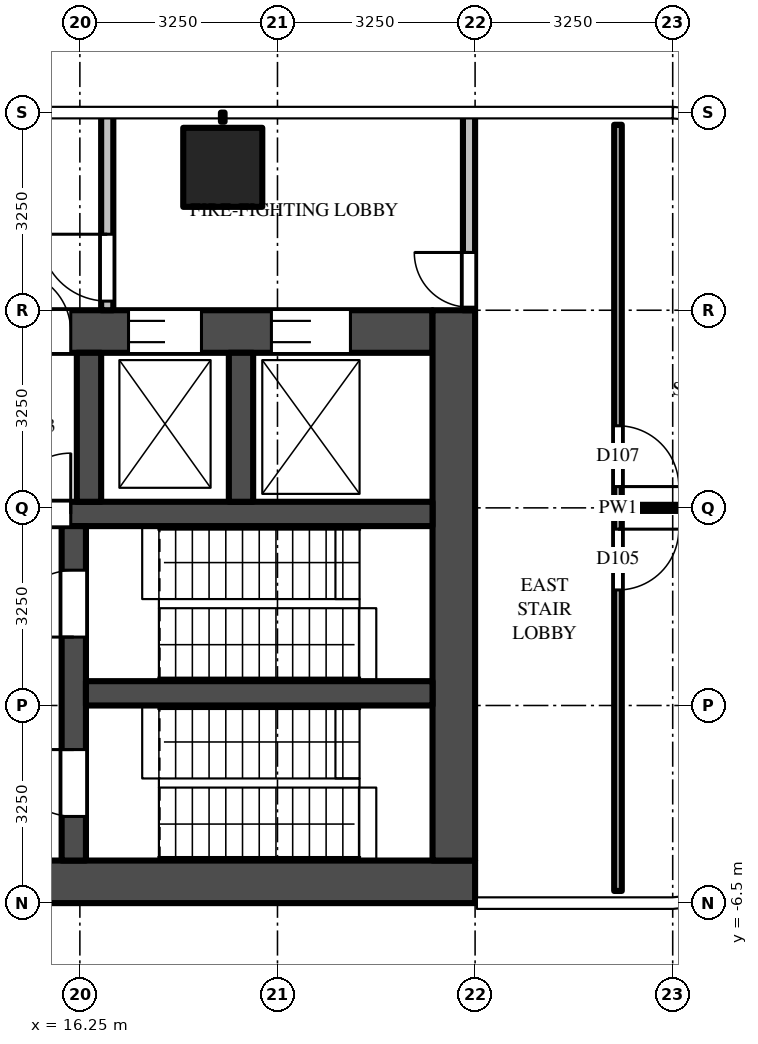
"""IFC4 building model, lengths in metres.
Left out: names, types, materials, properties, quantities, classifications, styles, units other than length and angle.
Written with IfcOpenShell. Run it as: python <this file> out.ifc"""

import sys

from ifc_helpers import new_model, si_unit, direction, frame, frame_2d, origin, origin_2d, place, context, subcontext, project, spatial, rectangle, extrude, source, transform, mapped, element, fill, save


model = new_model("IFC4")
c1 = context("Model", 3, precision=1e-05, world=origin(), true_north=direction((0.0, 1.0)))
c2 = subcontext(c1, "Body", "Model", "MODEL_VIEW")
j1 = project(units=[si_unit("LENGTHUNIT", "METRE"), si_unit("PLANEANGLEUNIT", "RADIAN")], contexts=[c1])
p1 = place(None, origin())
s1 = spatial("IfcSite", under=j1, at=p1, CompositionType="ELEMENT")
p2 = place(p1, origin())
s2 = spatial("IfcBuilding", under=s1, at=p2, CompositionType="ELEMENT")
p3 = place(p2, frame((0.0, 0.0, 106.5)))
s3 = spatial("IfcBuildingStorey", under=s2, at=p3, CompositionType="ELEMENT", Elevation=106.5)
m1 = source(origin(), c2, "Body", "SweptSolid", [
    extrude(rectangle(XDim=1.3, YDim=1.3, at=origin_2d()), origin(), (0.0, 0.0, 1.0), 4.5),
])
p4 = place(p3, frame((18.6, 5.6, 0.0), z_axis=(0.0, 0.0, 1.0), x_axis=(1.0, 0.0, 0.0)))
e1 = element("IfcColumn", 1, at=p4, inside=s3, PredefinedType="COLUMN", context=c2, shape_type="MappedRepresentation", body=[
    mapped(m1, transform((0.0, 0.0, 0.0))),
])
m2 = source(origin(), c2, "Body", "SweptSolid", [
    extrude(rectangle(XDim=16.5, YDim=0.7, at=frame_2d((8.25, 0.0))), origin(), (0.0, 0.0, 1.0), 4.25),
])
p5 = place(p3, frame((6.25, -6.15, 0.0), z_axis=(0.0, 0.0, 1.0), x_axis=(1.0, 0.0, 0.0)))
e2 = element("IfcWall", 2, at=p5, inside=s3, PredefinedType="SHEAR", context=c2, shape_type="MappedRepresentation", body=[
    mapped(m2, transform((0.0, 0.0, 0.0))),
])
m3 = source(origin(), c2, "Body", "SweptSolid", [
    extrude(rectangle(XDim=14.85, YDim=0.7, at=frame_2d((7.425, 0.0))), origin(), (0.0, 0.0, 1.0), 4.25),
])
p6 = place(p3, frame((7.2, 2.9, 0.0), z_axis=(0.0, 0.0, 1.0), x_axis=(1.0, 0.0, 0.0)))
e3 = element("IfcWall", 3, at=p6, inside=s3, PredefinedType="SHEAR", context=c2, shape_type="MappedRepresentation", body=[
    mapped(m3, transform((0.0, 0.0, 0.0))),
])
m4 = source(origin(), c2, "Body", "SweptSolid", [
    extrude(rectangle(XDim=1.3, YDim=2.1, at=frame_2d((0.65, 1.05))), frame((0.0, 0.36, 0.0), z_axis=(0.0, -1.0, 0.0), x_axis=(1.0, 0.0, 0.0)), (0.0, 0.0, 1.0), 0.72),
])
p7 = place(p6, frame((12.2, 0.0, 0.0)))
e4 = element("IfcOpeningElement", 4, at=p7, cuts=e3, PredefinedType="OPENING", context=c2, shape_type="MappedRepresentation", body=[
    mapped(m4, transform((0.0, 0.0, 0.0))),
])
m5 = source(origin(), c2, "Body", "SweptSolid", [
    extrude(rectangle(XDim=1.2, YDim=2.1, at=frame_2d((0.6, 1.05))), frame((0.0, 0.36, 0.0), z_axis=(0.0, -1.0, 0.0), x_axis=(1.0, 0.0, 0.0)), (0.0, 0.0, 1.0), 0.72),
])
p8 = place(p6, frame((9.85, 0.0, 0.0)))
e5 = element("IfcOpeningElement", 5, at=p8, cuts=e3, PredefinedType="OPENING", context=c2, shape_type="MappedRepresentation", body=[
    mapped(m5, transform((0.0, 0.0, 0.0))),
])
m6 = source(origin(), c2, "Body", "SweptSolid", [
    extrude(rectangle(XDim=1.0, YDim=2.1, at=frame_2d((0.5, 1.05))), frame((0.0, 0.36, 0.0), z_axis=(0.0, -1.0, 0.0), x_axis=(1.0, 0.0, 0.0)), (0.0, 0.0, 1.0), 0.72),
])
p9 = place(p6, frame((7.9, 0.0, 0.0)))
e6 = element("IfcOpeningElement", 6, at=p9, cuts=e3, PredefinedType="OPENING", context=c2, shape_type="MappedRepresentation", body=[
    mapped(m6, transform((0.0, 0.0, 0.0))),
])
m7 = source(origin(), c2, "Body", "SweptSolid", [
    extrude(rectangle(XDim=0.9, YDim=2.1, at=frame_2d((0.45, 1.05))), frame((0.0, 0.36, 0.0), z_axis=(0.0, -1.0, 0.0), x_axis=(1.0, 0.0, 0.0)), (0.0, 0.0, 1.0), 0.72),
])
p10 = place(p6, frame((0.65, 0.0, 0.0)))
e7 = element("IfcOpeningElement", 7, at=p10, cuts=e3, PredefinedType="OPENING", context=c2, shape_type="MappedRepresentation", body=[
    mapped(m7, transform((0.0, 0.0, 0.0))),
])
p11 = place(p6, frame((3.25, 0.0, 0.0)))
e8 = element("IfcOpeningElement", 8, at=p11, cuts=e3, PredefinedType="OPENING", context=c2, shape_type="MappedRepresentation", body=[
    mapped(m7, transform((0.0, 0.0, 0.0))),
])
p12 = place(p6, frame((5.8, 0.0, 0.0)))
e9 = element("IfcOpeningElement", 9, at=p12, cuts=e3, PredefinedType="OPENING", context=c2, shape_type="MappedRepresentation", body=[
    mapped(m6, transform((0.0, 0.0, 0.0))),
])
m8 = source(origin(), c2, "Body", "SweptSolid", [
    extrude(rectangle(XDim=9.05, YDim=0.7, at=frame_2d((4.525, 0.0))), origin(), (0.0, 0.0, 1.0), 4.25),
])
p13 = place(p3, frame((22.4, -5.8, 0.0), z_axis=(0.0, 0.0, 1.0), x_axis=(0.0, 1.0, 0.0)))
e10 = element("IfcWall", 10, at=p13, inside=s3, PredefinedType="SHEAR", context=c2, shape_type="MappedRepresentation", body=[
    mapped(m8, transform((0.0, 0.0, 0.0))),
])
m9 = source(origin(), c2, "Body", "SweptSolid", [
    extrude(rectangle(XDim=14.85, YDim=0.4, at=frame_2d((7.425, 0.0))), origin(), (0.0, 0.0, 1.0), 4.25),
])
p14 = place(p3, frame((7.2, -0.1, 0.0), z_axis=(0.0, 0.0, 1.0), x_axis=(1.0, 0.0, 0.0)))
e11 = element("IfcWall", 11, at=p14, inside=s3, PredefinedType="SHEAR", context=c2, shape_type="MappedRepresentation", body=[
    mapped(m9, transform((0.0, 0.0, 0.0))),
])
m10 = source(origin(), c2, "Body", "SweptSolid", [
    extrude(rectangle(XDim=1.0, YDim=2.1, at=frame_2d((0.5, 1.05))), frame((0.0, 0.21, 0.0), z_axis=(0.0, -1.0, 0.0), x_axis=(1.0, 0.0, 0.0)), (0.0, 0.0, 1.0), 0.42),
])
p15 = place(p14, frame((7.9, 0.0, 0.0)))
e12 = element("IfcOpeningElement", 12, at=p15, cuts=e11, PredefinedType="OPENING", context=c2, shape_type="MappedRepresentation", body=[
    mapped(m10, transform((0.0, 0.0, 0.0))),
])
m11 = source(origin(), c2, "Body", "SweptSolid", [
    extrude(rectangle(XDim=5.5, YDim=0.4, at=frame_2d((2.75, 0.0))), origin(), (0.0, 0.0, 1.0), 4.25),
])
p16 = place(p3, frame((16.15, -5.8, 0.0), z_axis=(0.0, 0.0, 1.0), x_axis=(0.0, 1.0, 0.0)))
e13 = element("IfcWall", 13, at=p16, inside=s3, PredefinedType="SHEAR", context=c2, shape_type="MappedRepresentation", body=[
    mapped(m11, transform((0.0, 0.0, 0.0))),
])
m12 = source(origin(), c2, "Body", "SweptSolid", [
    extrude(rectangle(XDim=1.1, YDim=2.1, at=frame_2d((0.55, 1.05))), frame((0.0, 0.21, 0.0), z_axis=(0.0, -1.0, 0.0), x_axis=(1.0, 0.0, 0.0)), (0.0, 0.0, 1.0), 0.42),
])
p17 = place(p16, frame((0.725, 0.0, 0.0)))
e14 = element("IfcOpeningElement", 14, at=p17, cuts=e13, PredefinedType="OPENING", context=c2, shape_type="MappedRepresentation", body=[
    mapped(m12, transform((0.0, 0.0, 0.0))),
])
p18 = place(p16, frame((3.675, 0.0, 0.0)))
e15 = element("IfcOpeningElement", 15, at=p18, cuts=e13, PredefinedType="OPENING", context=c2, shape_type="MappedRepresentation", body=[
    mapped(m12, transform((0.0, 0.0, 0.0))),
])
m13 = source(origin(), c2, "Body", "SweptSolid", [
    extrude(rectangle(XDim=5.7, YDim=0.4, at=frame_2d((2.85, 0.0))), origin(), (0.0, 0.0, 1.0), 4.25),
])
p19 = place(p3, frame((16.35, -3.05, 0.0), z_axis=(0.0, 0.0, 1.0), x_axis=(1.0, 0.0, 0.0)))
e16 = element("IfcWall", 16, at=p19, inside=s3, PredefinedType="SHEAR", context=c2, shape_type="MappedRepresentation", body=[
    mapped(m13, transform((0.0, 0.0, 0.0))),
])
m14 = source(origin(), c2, "Body", "SweptSolid", [
    extrude(rectangle(XDim=2.45, YDim=0.4, at=frame_2d((1.225, 0.0))), origin(), (0.0, 0.0, 1.0), 4.25),
])
for number, where, z_axis, x_axis in (
    (17, (16.4, 0.1, 0.0), (0.0, 0.0, 1.0), (0.0, 1.0, 0.0)),
    (18, (18.9, 0.1, 0.0), (0.0, 0.0, 1.0), (0.0, 1.0, 0.0)),
):
    element("IfcWall", number, at=place(p3, frame(where, z_axis=z_axis, x_axis=x_axis)), inside=s3, PredefinedType="SHEAR", context=c2, shape_type="MappedRepresentation", body=[
        mapped(m14, transform((0.0, 0.0, 0.0))),
    ])
m15 = source(origin(), c2, "Body", "SweptSolid", [
    extrude(rectangle(XDim=3.25, YDim=0.2, at=frame_2d((1.625, 0.0))), origin(), (0.0, 0.0, 1.0), 4.25),
])
p20 = place(p3, frame((16.7, 3.25, 0.0), z_axis=(0.0, 0.0, 1.0), x_axis=(0.0, 1.0, 0.0)))
e19 = element("IfcWall", 19, at=p20, inside=s3, PredefinedType="PARTITIONING", context=c2, shape_type="MappedRepresentation", body=[
    mapped(m15, transform((0.0, 0.0, 0.0))),
])
m16 = source(origin(), c2, "Body", "SweptSolid", [
    extrude(rectangle(XDim=1.1, YDim=2.1, at=frame_2d((0.55, 1.05))), frame((0.0, 0.11, 0.0), z_axis=(0.0, -1.0, 0.0), x_axis=(1.0, 0.0, 0.0)), (0.0, 0.0, 1.0), 0.22),
])
p21 = place(p20, frame((0.15, 0.0, 0.0)))
e20 = element("IfcOpeningElement", 20, at=p21, cuts=e19, PredefinedType="OPENING", context=c2, shape_type="MappedRepresentation", body=[
    mapped(m16, transform((0.0, 0.0, 0.0))),
])
p22 = place(p3, frame((22.65, 3.25, 0.0), z_axis=(0.0, 0.0, 1.0), x_axis=(0.0, 1.0, 0.0)))
e21 = element("IfcWall", 21, at=p22, inside=s3, PredefinedType="PARTITIONING", context=c2, shape_type="MappedRepresentation", body=[
    mapped(m15, transform((0.0, 0.0, 0.0))),
])
m17 = source(origin(), c2, "Body", "SweptSolid", [
    extrude(rectangle(XDim=0.9, YDim=2.1, at=frame_2d((0.45, 1.05))), frame((0.0, 0.11, 0.0), z_axis=(0.0, -1.0, 0.0), x_axis=(1.0, 0.0, 0.0)), (0.0, 0.0, 1.0), 0.22),
])
p23 = place(p22, frame((0.05, 0.0, 0.0)))
e22 = element("IfcOpeningElement", 22, at=p23, cuts=e21, PredefinedType="OPENING", context=c2, shape_type="MappedRepresentation", body=[
    mapped(m17, transform((0.0, 0.0, 0.0))),
])
m18 = source(origin(), c2, "Body", "SweptSolid", [
    extrude(rectangle(XDim=12.6, YDim=0.125, at=frame_2d((6.3, 0.0))), origin(), (0.0, 0.0, 1.0), 3.33),
])
p24 = place(p3, frame((25.1, 6.3, 0.0), z_axis=(0.0, 0.0, 1.0), x_axis=(0.0, -1.0, 0.0)))
e23 = element("IfcWall", 23, at=p24, inside=s3, PredefinedType="PARTITIONING", context=c2, shape_type="MappedRepresentation", body=[
    mapped(m18, transform((0.0, 0.0, 0.0))),
])
m19 = source(origin(), c2, "Body", "SweptSolid", [
    extrude(rectangle(XDim=1.0, YDim=2.1, at=frame_2d((0.5, 1.05))), frame((0.0, 0.073, 0.0), z_axis=(0.0, -1.0, 0.0), x_axis=(1.0, 0.0, 0.0)), (0.0, 0.0, 1.0), 0.145),
])
p25 = place(p24, frame((6.65, 0.0, 0.0)))
e24 = element("IfcOpeningElement", 24, at=p25, cuts=e23, PredefinedType="OPENING", context=c2, shape_type="MappedRepresentation", body=[
    mapped(m19, transform((0.0, 0.0, 0.0))),
])
p26 = place(p24, frame((4.95, 0.0, 0.0)))
e25 = element("IfcOpeningElement", 25, at=p26, cuts=e23, PredefinedType="OPENING", context=c2, shape_type="MappedRepresentation", body=[
    mapped(m19, transform((0.0, 0.0, 0.0))),
])
m20 = source(origin(), c2, "Body", "SweptSolid", [
    extrude(rectangle(XDim=3.887, YDim=0.1, at=frame_2d((1.944, 0.0))), origin(), (0.0, 0.0, 1.0), 3.33),
])
p27 = place(p3, frame((25.163, 0.0, 0.0), z_axis=(0.0, 0.0, 1.0), x_axis=(1.0, 0.0, 0.0)))
e26 = element("IfcWall", 26, at=p27, inside=s3, PredefinedType="PARTITIONING", context=c2, shape_type="MappedRepresentation", body=[
    mapped(m20, transform((0.0, 0.0, 0.0))),
])
m21 = source(origin(), c2, "Body", "SweptSolid", [
    extrude(rectangle(XDim=1.3, YDim=2.1, at=frame_2d((0.65, 1.05))), frame((0.0, -0.275, 0.0), z_axis=(0.0, -1.0, 0.0), x_axis=(1.0, 0.0, 0.0)), (0.0, 0.0, 1.0), 0.05),
])
p28 = place(p7, origin())
e27 = element("IfcDoor", 27, at=p28, inside=s3, OperationType="DOUBLE_DOOR_SLIDING", PredefinedType="DOOR", context=c2, shape_type="MappedRepresentation", body=[
    mapped(m21, transform((0.0, 0.0, 0.0))),
])
fill(e4, e27)
m22 = source(origin(), c2, "Body", "SweptSolid", [
    extrude(rectangle(XDim=1.2, YDim=2.1, at=frame_2d((0.6, 1.05))), frame((0.0, -0.275, 0.0), z_axis=(0.0, -1.0, 0.0), x_axis=(1.0, 0.0, 0.0)), (0.0, 0.0, 1.0), 0.05),
])
p29 = place(p8, origin())
e28 = element("IfcDoor", 28, at=p29, inside=s3, OperationType="DOUBLE_DOOR_SLIDING", PredefinedType="DOOR", context=c2, shape_type="MappedRepresentation", body=[
    mapped(m22, transform((0.0, 0.0, 0.0))),
])
fill(e5, e28)
m23 = source(origin(), c2, "Body", "SweptSolid", [
    extrude(rectangle(XDim=1.1, YDim=2.1, at=frame_2d((0.55, 1.05))), frame((0.0, 0.025, 0.0), z_axis=(0.0, -1.0, 0.0), x_axis=(1.0, 0.0, 0.0)), (0.0, 0.0, 1.0), 0.05),
])
p30 = place(p17, origin())
e29 = element("IfcDoor", 29, at=p30, inside=s3, OperationType="SINGLE_SWING_RIGHT", PredefinedType="DOOR", context=c2, shape_type="MappedRepresentation", body=[
    mapped(m23, transform((0.0, 0.0, 0.0))),
])
fill(e14, e29)
p31 = place(p18, origin())
e30 = element("IfcDoor", 30, at=p31, inside=s3, OperationType="SINGLE_SWING_LEFT", PredefinedType="DOOR", context=c2, shape_type="MappedRepresentation", body=[
    mapped(m23, transform((0.0, 0.0, 0.0))),
])
fill(e15, e30)
m24 = source(origin(), c2, "Body", "SweptSolid", [
    extrude(rectangle(XDim=1.0, YDim=2.1, at=frame_2d((0.5, 1.05))), frame((0.0, 0.025, 0.0), z_axis=(0.0, -1.0, 0.0), x_axis=(1.0, 0.0, 0.0)), (0.0, 0.0, 1.0), 0.05),
])
p32 = place(p15, origin())
e31 = element("IfcDoor", 31, at=p32, inside=s3, OperationType="SINGLE_SWING_RIGHT", PredefinedType="DOOR", context=c2, shape_type="MappedRepresentation", body=[
    mapped(m24, transform((0.0, 0.0, 0.0))),
])
fill(e12, e31)
m25 = source(origin(), c2, "Body", "SweptSolid", [
    extrude(rectangle(XDim=1.0, YDim=2.1, at=frame_2d((0.5, 1.05))), frame((0.0, -0.275, 0.0), z_axis=(0.0, -1.0, 0.0), x_axis=(1.0, 0.0, 0.0)), (0.0, 0.0, 1.0), 0.05),
])
p33 = place(p9, origin())
e32 = element("IfcDoor", 32, at=p33, inside=s3, OperationType="SINGLE_SWING_LEFT", PredefinedType="DOOR", context=c2, shape_type="MappedRepresentation", body=[
    mapped(m25, transform((0.0, 0.0, 0.0))),
])
fill(e6, e32)
p34 = place(p21, origin())
e33 = element("IfcDoor", 33, at=p34, inside=s3, OperationType="SINGLE_SWING_RIGHT", PredefinedType="DOOR", context=c2, shape_type="MappedRepresentation", body=[
    mapped(m23, transform((0.0, 0.0, 0.0))),
])
fill(e20, e33)
m26 = source(origin(), c2, "Body", "SweptSolid", [
    extrude(rectangle(XDim=0.9, YDim=2.1, at=frame_2d((0.45, 1.05))), frame((0.0, 0.025, 0.0), z_axis=(0.0, -1.0, 0.0), x_axis=(1.0, 0.0, 0.0)), (0.0, 0.0, 1.0), 0.05),
])
p35 = place(p23, origin())
e34 = element("IfcDoor", 34, at=p35, inside=s3, OperationType="SINGLE_SWING_RIGHT", PredefinedType="DOOR", context=c2, shape_type="MappedRepresentation", body=[
    mapped(m26, transform((0.0, 0.0, 0.0))),
])
fill(e22, e34)
p36 = place(p25, origin())
e35 = element("IfcDoor", 35, at=p36, inside=s3, OperationType="SINGLE_SWING_LEFT", PredefinedType="DOOR", context=c2, shape_type="MappedRepresentation", body=[
    mapped(m24, transform((0.0, 0.0, 0.0))),
])
fill(e24, e35)
p37 = place(p26, origin())
e36 = element("IfcDoor", 36, at=p37, inside=s3, OperationType="SINGLE_SWING_RIGHT", PredefinedType="DOOR", context=c2, shape_type="MappedRepresentation", body=[
    mapped(m24, transform((0.0, 0.0, 0.0))),
])
fill(e25, e36)
save(model, sys.argv[1])
